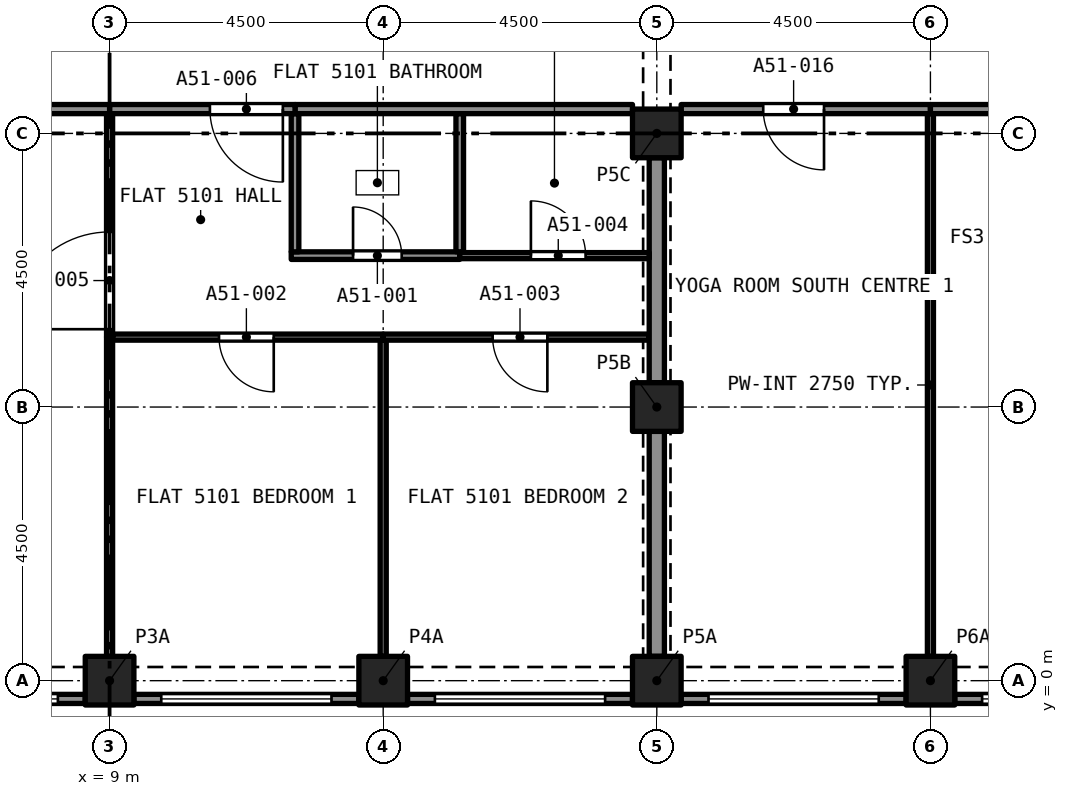
"""IFC4 building model, lengths in metres.
Left out: names, types, materials, properties, quantities, classifications, styles, units other than length and angle.
Written with IfcOpenShell. Run it as: python <this file> out.ifc"""

import sys

from ifc_helpers import new_model, si_unit, direction, frame, frame_2d, origin, origin_2d, place, context, subcontext, project, spatial, rectangle, extrude, element, fill, save


model = new_model("IFC4")
c1 = context("Model", 3, precision=1e-05, world=origin(), true_north=direction((0.0, 1.0)))
c2 = subcontext(c1, "Body", "Model", "MODEL_VIEW")
j1 = project(units=[si_unit("LENGTHUNIT", "METRE"), si_unit("PLANEANGLEUNIT", "RADIAN")], contexts=[c1])
p1 = place(None, origin())
s1 = spatial("IfcSite", under=j1, at=p1, CompositionType="ELEMENT")
p2 = place(p1, origin())
s2 = spatial("IfcBuilding", under=s1, at=p2, CompositionType="ELEMENT")
p3 = place(p2, frame((0.0, 0.0, 185.9)))
s3 = spatial("IfcBuildingStorey", under=s2, at=p3, CompositionType="ELEMENT", Elevation=185.9)
for number, where, z_axis, x_axis in (
    (1, (9.0, 0.0, 0.0), (0.0, 0.0, 1.0), (1.0, 0.0, 0.0)),
    (2, (13.5, 0.0, 0.0), (0.0, 0.0, 1.0), (1.0, 0.0, 0.0)),
    (3, (18.0, 0.0, 0.0), (0.0, 0.0, 1.0), (1.0, 0.0, 0.0)),
    (4, (22.5, 0.0, 0.0), (0.0, 0.0, 1.0), (1.0, 0.0, 0.0)),
    (5, (18.0, 4.5, 0.0), (0.0, 0.0, 1.0), (1.0, 0.0, 0.0)),
    (6, (18.0, 9.0, 0.0), (0.0, 0.0, 1.0), (1.0, 0.0, 0.0)),
):
    element("IfcColumn", number, at=place(p3, frame(where, z_axis=z_axis, x_axis=x_axis)), inside=s3, PredefinedType="COLUMN", context=c2, shape_type="SweptSolid", body=[
        extrude(rectangle(XDim=0.8, YDim=0.8, at=origin_2d()), origin(), (0.0, 0.0, 1.0), 3.2),
    ])
p4 = place(p3, frame((8.6, -0.3, 0.0), z_axis=(0.0, 0.0, 1.0), x_axis=(-1.0, 0.0, 0.0)))
e7 = element("IfcWall", 7, at=p4, inside=s3, PredefinedType="SOLIDWALL", context=c2, shape_type="SweptSolid", body=[
    extrude(rectangle(XDim=3.7, YDim=0.15, at=frame_2d((1.85, 0.0))), origin(), (0.0, 0.0, 1.0), 3.2),
])
p5 = place(p4, frame((0.45, 0.0, 0.45)))
e8 = element("IfcOpeningElement", 8, at=p5, cuts=e7, PredefinedType="OPENING", context=c2, shape_type="SweptSolid", body=[
    extrude(rectangle(XDim=2.8, YDim=1.95, at=frame_2d((1.4, 0.975))), frame((0.0, 0.085, 0.0), z_axis=(0.0, -1.0, 0.0), x_axis=(1.0, 0.0, 0.0)), (0.0, 0.0, 1.0), 0.17),
])
p6 = place(p3, frame((13.1, -0.3, 0.0), z_axis=(0.0, 0.0, 1.0), x_axis=(-1.0, 0.0, 0.0)))
e9 = element("IfcWall", 9, at=p6, inside=s3, PredefinedType="SOLIDWALL", context=c2, shape_type="SweptSolid", body=[
    extrude(rectangle(XDim=3.7, YDim=0.15, at=frame_2d((1.85, 0.0))), origin(), (0.0, 0.0, 1.0), 3.2),
])
p7 = place(p6, frame((0.45, 0.0, 0.45)))
e10 = element("IfcOpeningElement", 10, at=p7, cuts=e9, PredefinedType="OPENING", context=c2, shape_type="SweptSolid", body=[
    extrude(rectangle(XDim=2.8, YDim=1.95, at=frame_2d((1.4, 0.975))), frame((0.0, 0.085, 0.0), z_axis=(0.0, -1.0, 0.0), x_axis=(1.0, 0.0, 0.0)), (0.0, 0.0, 1.0), 0.17),
])
p8 = place(p3, frame((17.6, -0.3, 0.0), z_axis=(0.0, 0.0, 1.0), x_axis=(-1.0, 0.0, 0.0)))
e11 = element("IfcWall", 11, at=p8, inside=s3, PredefinedType="SOLIDWALL", context=c2, shape_type="SweptSolid", body=[
    extrude(rectangle(XDim=3.7, YDim=0.15, at=frame_2d((1.85, 0.0))), origin(), (0.0, 0.0, 1.0), 3.2),
])
p9 = place(p8, frame((0.45, 0.0, 0.45)))
e12 = element("IfcOpeningElement", 12, at=p9, cuts=e11, PredefinedType="OPENING", context=c2, shape_type="SweptSolid", body=[
    extrude(rectangle(XDim=2.8, YDim=1.95, at=frame_2d((1.4, 0.975))), frame((0.0, 0.085, 0.0), z_axis=(0.0, -1.0, 0.0), x_axis=(1.0, 0.0, 0.0)), (0.0, 0.0, 1.0), 0.17),
])
p10 = place(p3, frame((22.1, -0.3, 0.0), z_axis=(0.0, 0.0, 1.0), x_axis=(-1.0, 0.0, 0.0)))
e13 = element("IfcWall", 13, at=p10, inside=s3, PredefinedType="SOLIDWALL", context=c2, shape_type="SweptSolid", body=[
    extrude(rectangle(XDim=3.7, YDim=0.15, at=frame_2d((1.85, 0.0))), origin(), (0.0, 0.0, 1.0), 3.2),
])
p11 = place(p10, frame((0.45, 0.0, 0.45)))
e14 = element("IfcOpeningElement", 14, at=p11, cuts=e13, PredefinedType="OPENING", context=c2, shape_type="SweptSolid", body=[
    extrude(rectangle(XDim=2.8, YDim=1.95, at=frame_2d((1.4, 0.975))), frame((0.0, 0.085, 0.0), z_axis=(0.0, -1.0, 0.0), x_axis=(1.0, 0.0, 0.0)), (0.0, 0.0, 1.0), 0.17),
])
p12 = place(p3, frame((26.6, -0.3, 0.0), z_axis=(0.0, 0.0, 1.0), x_axis=(-1.0, 0.0, 0.0)))
e15 = element("IfcWall", 15, at=p12, inside=s3, PredefinedType="SOLIDWALL", context=c2, shape_type="SweptSolid", body=[
    extrude(rectangle(XDim=3.7, YDim=0.15, at=frame_2d((1.85, 0.0))), origin(), (0.0, 0.0, 1.0), 3.2),
])
p13 = place(p12, frame((0.45, 0.0, 0.45)))
e16 = element("IfcOpeningElement", 16, at=p13, cuts=e15, PredefinedType="OPENING", context=c2, shape_type="SweptSolid", body=[
    extrude(rectangle(XDim=2.8, YDim=1.95, at=frame_2d((1.4, 0.975))), frame((0.0, 0.085, 0.0), z_axis=(0.0, -1.0, 0.0), x_axis=(1.0, 0.0, 0.0)), (0.0, 0.0, 1.0), 0.17),
])
p14 = place(p3, frame((11.988, 6.99, 0.0), z_axis=(0.0, 0.0, 1.0), x_axis=(1.0, 0.0, 0.0)))
e17 = element("IfcWall", 17, at=p14, inside=s3, PredefinedType="PARTITIONING", context=c2, shape_type="SweptSolid", body=[
    extrude(rectangle(XDim=2.771, YDim=0.125, at=frame_2d((1.385, 0.0))), origin(), (0.0, 0.0, 1.0), 2.9),
])
p15 = place(p14, frame((1.017, 0.0, 0.0)))
e18 = element("IfcOpeningElement", 18, at=p15, cuts=e17, PredefinedType="OPENING", context=c2, shape_type="SweptSolid", body=[
    extrude(rectangle(XDim=0.8, YDim=2.1, at=frame_2d((0.4, 1.05))), frame((0.0, 0.073, 0.0), z_axis=(0.0, -1.0, 0.0), x_axis=(1.0, 0.0, 0.0)), (0.0, 0.0, 1.0), 0.145),
])
for number, where, z_axis, x_axis in (
    (19, (12.05, 7.052, 0.0), (0.0, 0.0, 1.0), (0.0, 1.0, 0.0)),
    (20, (14.759, 7.052, 0.0), (0.0, 0.0, 1.0), (0.0, 1.0, 0.0)),
):
    element("IfcWall", number, at=place(p3, frame(where, z_axis=z_axis, x_axis=x_axis)), inside=s3, PredefinedType="PARTITIONING", context=c2, shape_type="SweptSolid", body=[
        extrude(rectangle(XDim=2.272, YDim=0.125, at=frame_2d((1.136, 0.0))), origin(), (0.0, 0.0, 1.0), 2.9),
    ])
p16 = place(p3, frame((12.05, 9.4, 0.0), z_axis=(0.0, 0.0, 1.0), x_axis=(1.0, 0.0, 0.0)))
e21 = element("IfcWall", 21, at=p16, inside=s3, PredefinedType="PARTITIONING", context=c2, shape_type="SweptSolid", body=[
    extrude(rectangle(XDim=5.55, YDim=0.15, at=frame_2d((2.775, 0.0))), origin(), (0.0, 0.0, 1.0), 2.9),
])
p17 = place(p3, frame((13.5, 0.4, 0.0), z_axis=(0.0, 0.0, 1.0), x_axis=(0.0, 1.0, 0.0)))
e22 = element("IfcWall", 22, at=p17, inside=s3, PredefinedType="PARTITIONING", context=c2, shape_type="SweptSolid", body=[
    extrude(rectangle(XDim=5.2, YDim=0.1, at=frame_2d((2.6, 0.0))), origin(), (0.0, 0.0, 1.0), 2.9),
])
p18 = place(p3, frame((13.5, 5.65, 0.0), z_axis=(0.0, 0.0, 1.0), x_axis=(-1.0, 0.0, 0.0)))
e23 = element("IfcWall", 23, at=p18, inside=s3, PredefinedType="PARTITIONING", context=c2, shape_type="SweptSolid", body=[
    extrude(rectangle(XDim=4.45, YDim=0.1, at=frame_2d((2.225, 0.0))), origin(), (0.0, 0.0, 1.0), 2.9),
])
p19 = place(p18, frame((1.8, 0.0, 0.0)))
e24 = element("IfcOpeningElement", 24, at=p19, cuts=e23, PredefinedType="OPENING", context=c2, shape_type="SweptSolid", body=[
    extrude(rectangle(XDim=0.9, YDim=2.1, at=frame_2d((0.45, 1.05))), frame((0.0, 0.06, 0.0), z_axis=(0.0, -1.0, 0.0), x_axis=(1.0, 0.0, 0.0)), (0.0, 0.0, 1.0), 0.12),
])
p20 = place(p3, frame((9.0, 0.4, 0.0), z_axis=(0.0, 0.0, 1.0), x_axis=(0.0, 1.0, 0.0)))
e25 = element("IfcWall", 25, at=p20, inside=s3, PredefinedType="PARTITIONING", context=c2, shape_type="SweptSolid", body=[
    extrude(rectangle(XDim=5.25, YDim=0.1, at=frame_2d((2.625, 0.0))), origin(), (0.0, 0.0, 1.0), 2.9),
])
p21 = place(p3, frame((17.875, 5.65, 0.0), z_axis=(0.0, 0.0, 1.0), x_axis=(-1.0, 0.0, 0.0)))
e26 = element("IfcWall", 26, at=p21, inside=s3, PredefinedType="PARTITIONING", context=c2, shape_type="SweptSolid", body=[
    extrude(rectangle(XDim=4.375, YDim=0.1, at=frame_2d((2.188, 0.0))), origin(), (0.0, 0.0, 1.0), 2.9),
])
p22 = place(p21, frame((1.675, 0.0, 0.0)))
e27 = element("IfcOpeningElement", 27, at=p22, cuts=e26, PredefinedType="OPENING", context=c2, shape_type="SweptSolid", body=[
    extrude(rectangle(XDim=0.9, YDim=2.1, at=frame_2d((0.45, 1.05))), frame((0.0, 0.06, 0.0), z_axis=(0.0, -1.0, 0.0), x_axis=(1.0, 0.0, 0.0)), (0.0, 0.0, 1.0), 0.12),
])
for number, where, z_axis, x_axis in (
    (28, (18.0, 4.9, 0.0), (0.0, 0.0, 1.0), (0.0, 1.0, 0.0)),
    (29, (18.0, 0.4, 0.0), (0.0, 0.0, 1.0), (0.0, 1.0, 0.0)),
):
    element("IfcWall", number, at=place(p3, frame(where, z_axis=z_axis, x_axis=x_axis)), inside=s3, PredefinedType="PARTITIONING", context=c2, shape_type="SweptSolid", body=[
        extrude(rectangle(XDim=3.7, YDim=0.25, at=frame_2d((1.85, 0.0))), origin(), (0.0, 0.0, 1.0), 2.38),
    ])
p23 = place(p3, frame((14.759, 6.99, 0.0), z_axis=(0.0, 0.0, 1.0), x_axis=(1.0, 0.0, 0.0)))
e30 = element("IfcWall", 30, at=p23, inside=s3, PredefinedType="PARTITIONING", context=c2, shape_type="SweptSolid", body=[
    extrude(rectangle(XDim=3.116, YDim=0.1, at=frame_2d((1.558, 0.0))), origin(), (0.0, 0.0, 1.0), 2.9),
])
p24 = place(p23, frame((1.171, 0.0, 0.0)))
e31 = element("IfcOpeningElement", 31, at=p24, cuts=e30, PredefinedType="OPENING", context=c2, shape_type="SweptSolid", body=[
    extrude(rectangle(XDim=0.9, YDim=2.1, at=frame_2d((0.45, 1.05))), frame((0.0, 0.06, 0.0), z_axis=(0.0, -1.0, 0.0), x_axis=(1.0, 0.0, 0.0)), (0.0, 0.0, 1.0), 0.12),
])
p25 = place(p3, frame((9.0, 5.65, 0.0), z_axis=(0.0, 0.0, 1.0), x_axis=(0.0, 1.0, 0.0)))
e32 = element("IfcWall", 32, at=p25, inside=s3, PredefinedType="PARTITIONING", context=c2, shape_type="SweptSolid", body=[
    extrude(rectangle(XDim=3.675, YDim=0.1, at=frame_2d((1.837, 0.0))), origin(), (0.0, 0.0, 1.0), 2.9),
])
p26 = place(p25, frame((0.13, 0.0, 0.0)))
e33 = element("IfcOpeningElement", 33, at=p26, cuts=e32, PredefinedType="OPENING", context=c2, shape_type="SweptSolid", body=[
    extrude(rectangle(XDim=1.6, YDim=2.1, at=frame_2d((0.8, 1.05))), frame((0.0, 0.06, 0.0), z_axis=(0.0, -1.0, 0.0), x_axis=(1.0, 0.0, 0.0)), (0.0, 0.0, 1.0), 0.12),
])
p27 = place(p3, frame((12.05, 9.4, 0.0), z_axis=(0.0, 0.0, 1.0), x_axis=(-1.0, 0.0, 0.0)))
e34 = element("IfcWall", 34, at=p27, inside=s3, PredefinedType="PARTITIONING", context=c2, shape_type="SweptSolid", body=[
    extrude(rectangle(XDim=3.05, YDim=0.15, at=frame_2d((1.525, 0.0))), origin(), (0.0, 0.0, 1.0), 2.9),
])
p28 = place(p27, frame((0.2, 0.0, 0.0)))
e35 = element("IfcOpeningElement", 35, at=p28, cuts=e34, PredefinedType="OPENING", context=c2, shape_type="SweptSolid", body=[
    extrude(rectangle(XDim=1.2, YDim=2.4, at=frame_2d((0.6, 1.2))), frame((0.0, 0.085, 0.0), z_axis=(0.0, -1.0, 0.0), x_axis=(1.0, 0.0, 0.0)), (0.0, 0.0, 1.0), 0.17),
])
p29 = place(p3, frame((0.4, 9.4, 0.0), z_axis=(0.0, 0.0, 1.0), x_axis=(1.0, 0.0, 0.0)))
e36 = element("IfcWall", 36, at=p29, inside=s3, PredefinedType="PARTITIONING", context=c2, shape_type="SweptSolid", body=[
    extrude(rectangle(XDim=8.6, YDim=0.15, at=frame_2d((4.3, 0.0))), origin(), (0.0, 0.0, 1.0), 2.9),
])
p30 = place(p3, frame((22.5, 0.4, 0.0), z_axis=(0.0, 0.0, 1.0), x_axis=(0.0, 1.0, 0.0)))
e37 = element("IfcWall", 37, at=p30, inside=s3, PredefinedType="PARTITIONING", context=c2, shape_type="SweptSolid", body=[
    extrude(rectangle(XDim=8.925, YDim=0.1, at=frame_2d((4.462, 0.0))), origin(), (0.0, 0.0, 1.0), 2.75),
])
p31 = place(p3, frame((22.5, 9.4, 0.0), z_axis=(0.0, 0.0, 1.0), x_axis=(-1.0, 0.0, 0.0)))
e38 = element("IfcWall", 38, at=p31, inside=s3, PredefinedType="PARTITIONING", context=c2, shape_type="SweptSolid", body=[
    extrude(rectangle(XDim=4.1, YDim=0.15, at=frame_2d((2.05, 0.0))), origin(), (0.0, 0.0, 1.0), 2.75),
])
p32 = place(p31, frame((1.75, 0.0, 0.0)))
e39 = element("IfcOpeningElement", 39, at=p32, cuts=e38, PredefinedType="OPENING", context=c2, shape_type="SweptSolid", body=[
    extrude(rectangle(XDim=1.0, YDim=2.1, at=frame_2d((0.5, 1.05))), frame((0.0, 0.085, 0.0), z_axis=(0.0, -1.0, 0.0), x_axis=(1.0, 0.0, 0.0)), (0.0, 0.0, 1.0), 0.17),
])
p33 = place(p3, frame((31.1, 9.4, 0.0), z_axis=(0.0, 0.0, 1.0), x_axis=(-1.0, 0.0, 0.0)))
e40 = element("IfcWall", 40, at=p33, inside=s3, PredefinedType="PARTITIONING", context=c2, shape_type="SweptSolid", body=[
    extrude(rectangle(XDim=8.6, YDim=0.15, at=frame_2d((4.3, 0.0))), origin(), (0.0, 0.0, 1.0), 2.75),
])
p34 = place(p33, frame((3.8, 0.0, 0.0)))
e41 = element("IfcOpeningElement", 41, at=p34, cuts=e40, PredefinedType="OPENING", context=c2, shape_type="SweptSolid", body=[
    extrude(rectangle(XDim=1.0, YDim=2.1, at=frame_2d((0.5, 1.05))), frame((0.0, 0.085, 0.0), z_axis=(0.0, -1.0, 0.0), x_axis=(1.0, 0.0, 0.0)), (0.0, 0.0, 1.0), 0.17),
])
p35 = place(p5, origin())
e42 = element("IfcWindow", 42, at=p35, inside=s3, PartitioningType="SINGLE_PANEL", PredefinedType="WINDOW", context=c2, shape_type="SweptSolid", body=[
    extrude(rectangle(XDim=2.8, YDim=1.95, at=frame_2d((1.4, 0.975))), frame((0.0, 0.03, 0.0), z_axis=(0.0, -1.0, 0.0), x_axis=(1.0, 0.0, 0.0)), (0.0, 0.0, 1.0), 0.06),
])
fill(e8, e42)
p36 = place(p7, origin())
e43 = element("IfcWindow", 43, at=p36, inside=s3, PartitioningType="SINGLE_PANEL", PredefinedType="WINDOW", context=c2, shape_type="SweptSolid", body=[
    extrude(rectangle(XDim=2.8, YDim=1.95, at=frame_2d((1.4, 0.975))), frame((0.0, 0.03, 0.0), z_axis=(0.0, -1.0, 0.0), x_axis=(1.0, 0.0, 0.0)), (0.0, 0.0, 1.0), 0.06),
])
fill(e10, e43)
p37 = place(p9, origin())
e44 = element("IfcWindow", 44, at=p37, inside=s3, PartitioningType="SINGLE_PANEL", PredefinedType="WINDOW", context=c2, shape_type="SweptSolid", body=[
    extrude(rectangle(XDim=2.8, YDim=1.95, at=frame_2d((1.4, 0.975))), frame((0.0, 0.03, 0.0), z_axis=(0.0, -1.0, 0.0), x_axis=(1.0, 0.0, 0.0)), (0.0, 0.0, 1.0), 0.06),
])
fill(e12, e44)
p38 = place(p11, origin())
e45 = element("IfcWindow", 45, at=p38, inside=s3, PartitioningType="SINGLE_PANEL", PredefinedType="WINDOW", context=c2, shape_type="SweptSolid", body=[
    extrude(rectangle(XDim=2.8, YDim=1.95, at=frame_2d((1.4, 0.975))), frame((0.0, 0.03, 0.0), z_axis=(0.0, -1.0, 0.0), x_axis=(1.0, 0.0, 0.0)), (0.0, 0.0, 1.0), 0.06),
])
fill(e14, e45)
p39 = place(p13, origin())
e46 = element("IfcWindow", 46, at=p39, inside=s3, PartitioningType="SINGLE_PANEL", PredefinedType="WINDOW", context=c2, shape_type="SweptSolid", body=[
    extrude(rectangle(XDim=2.8, YDim=1.95, at=frame_2d((1.4, 0.975))), frame((0.0, 0.03, 0.0), z_axis=(0.0, -1.0, 0.0), x_axis=(1.0, 0.0, 0.0)), (0.0, 0.0, 1.0), 0.06),
])
fill(e16, e46)
p40 = place(p15, origin())
e47 = element("IfcDoor", 47, at=p40, inside=s3, OperationType="SINGLE_SWING_RIGHT", PredefinedType="DOOR", context=c2, shape_type="SweptSolid", body=[
    extrude(rectangle(XDim=0.8, YDim=2.1, at=frame_2d((0.4, 1.05))), frame((0.0, 0.025, 0.0), z_axis=(0.0, -1.0, 0.0), x_axis=(1.0, 0.0, 0.0)), (0.0, 0.0, 1.0), 0.05),
])
fill(e18, e47)
p41 = place(p19, origin())
e48 = element("IfcDoor", 48, at=p41, inside=s3, OperationType="SINGLE_SWING_RIGHT", PredefinedType="DOOR", context=c2, shape_type="SweptSolid", body=[
    extrude(rectangle(XDim=0.9, YDim=2.1, at=frame_2d((0.45, 1.05))), frame((0.0, 0.025, 0.0), z_axis=(0.0, -1.0, 0.0), x_axis=(1.0, 0.0, 0.0)), (0.0, 0.0, 1.0), 0.05),
])
fill(e24, e48)
p42 = place(p22, origin())
e49 = element("IfcDoor", 49, at=p42, inside=s3, OperationType="SINGLE_SWING_LEFT", PredefinedType="DOOR", context=c2, shape_type="SweptSolid", body=[
    extrude(rectangle(XDim=0.9, YDim=2.1, at=frame_2d((0.45, 1.05))), frame((0.0, 0.025, 0.0), z_axis=(0.0, -1.0, 0.0), x_axis=(1.0, 0.0, 0.0)), (0.0, 0.0, 1.0), 0.05),
])
fill(e27, e49)
p43 = place(p24, origin())
e50 = element("IfcDoor", 50, at=p43, inside=s3, OperationType="SINGLE_SWING_RIGHT", PredefinedType="DOOR", context=c2, shape_type="SweptSolid", body=[
    extrude(rectangle(XDim=0.9, YDim=2.1, at=frame_2d((0.45, 1.05))), frame((0.0, 0.025, 0.0), z_axis=(0.0, -1.0, 0.0), x_axis=(1.0, 0.0, 0.0)), (0.0, 0.0, 1.0), 0.05),
])
fill(e31, e50)
p44 = place(p26, origin())
e51 = element("IfcDoor", 51, at=p44, inside=s3, OperationType="SINGLE_SWING_LEFT", PredefinedType="DOOR", context=c2, shape_type="SweptSolid", body=[
    extrude(rectangle(XDim=1.6, YDim=2.1, at=frame_2d((0.8, 1.05))), frame((0.0, 0.025, 0.0), z_axis=(0.0, -1.0, 0.0), x_axis=(1.0, 0.0, 0.0)), (0.0, 0.0, 1.0), 0.05),
])
fill(e33, e51)
p45 = place(p28, origin())
e52 = element("IfcDoor", 52, at=p45, inside=s3, OperationType="SINGLE_SWING_LEFT", PredefinedType="DOOR", context=c2, shape_type="SweptSolid", body=[
    extrude(rectangle(XDim=1.2, YDim=2.4, at=frame_2d((0.6, 1.2))), frame((0.0, 0.025, 0.0), z_axis=(0.0, -1.0, 0.0), x_axis=(1.0, 0.0, 0.0)), (0.0, 0.0, 1.0), 0.05),
])
fill(e35, e52)
p46 = place(p32, origin())
e53 = element("IfcDoor", 53, at=p46, inside=s3, OperationType="SINGLE_SWING_RIGHT", PredefinedType="DOOR", context=c2, shape_type="SweptSolid", body=[
    extrude(rectangle(XDim=1.0, YDim=2.1, at=frame_2d((0.5, 1.05))), frame((0.0, 0.025, 0.0), z_axis=(0.0, -1.0, 0.0), x_axis=(1.0, 0.0, 0.0)), (0.0, 0.0, 1.0), 0.05),
])
fill(e39, e53)
save(model, sys.argv[1])
